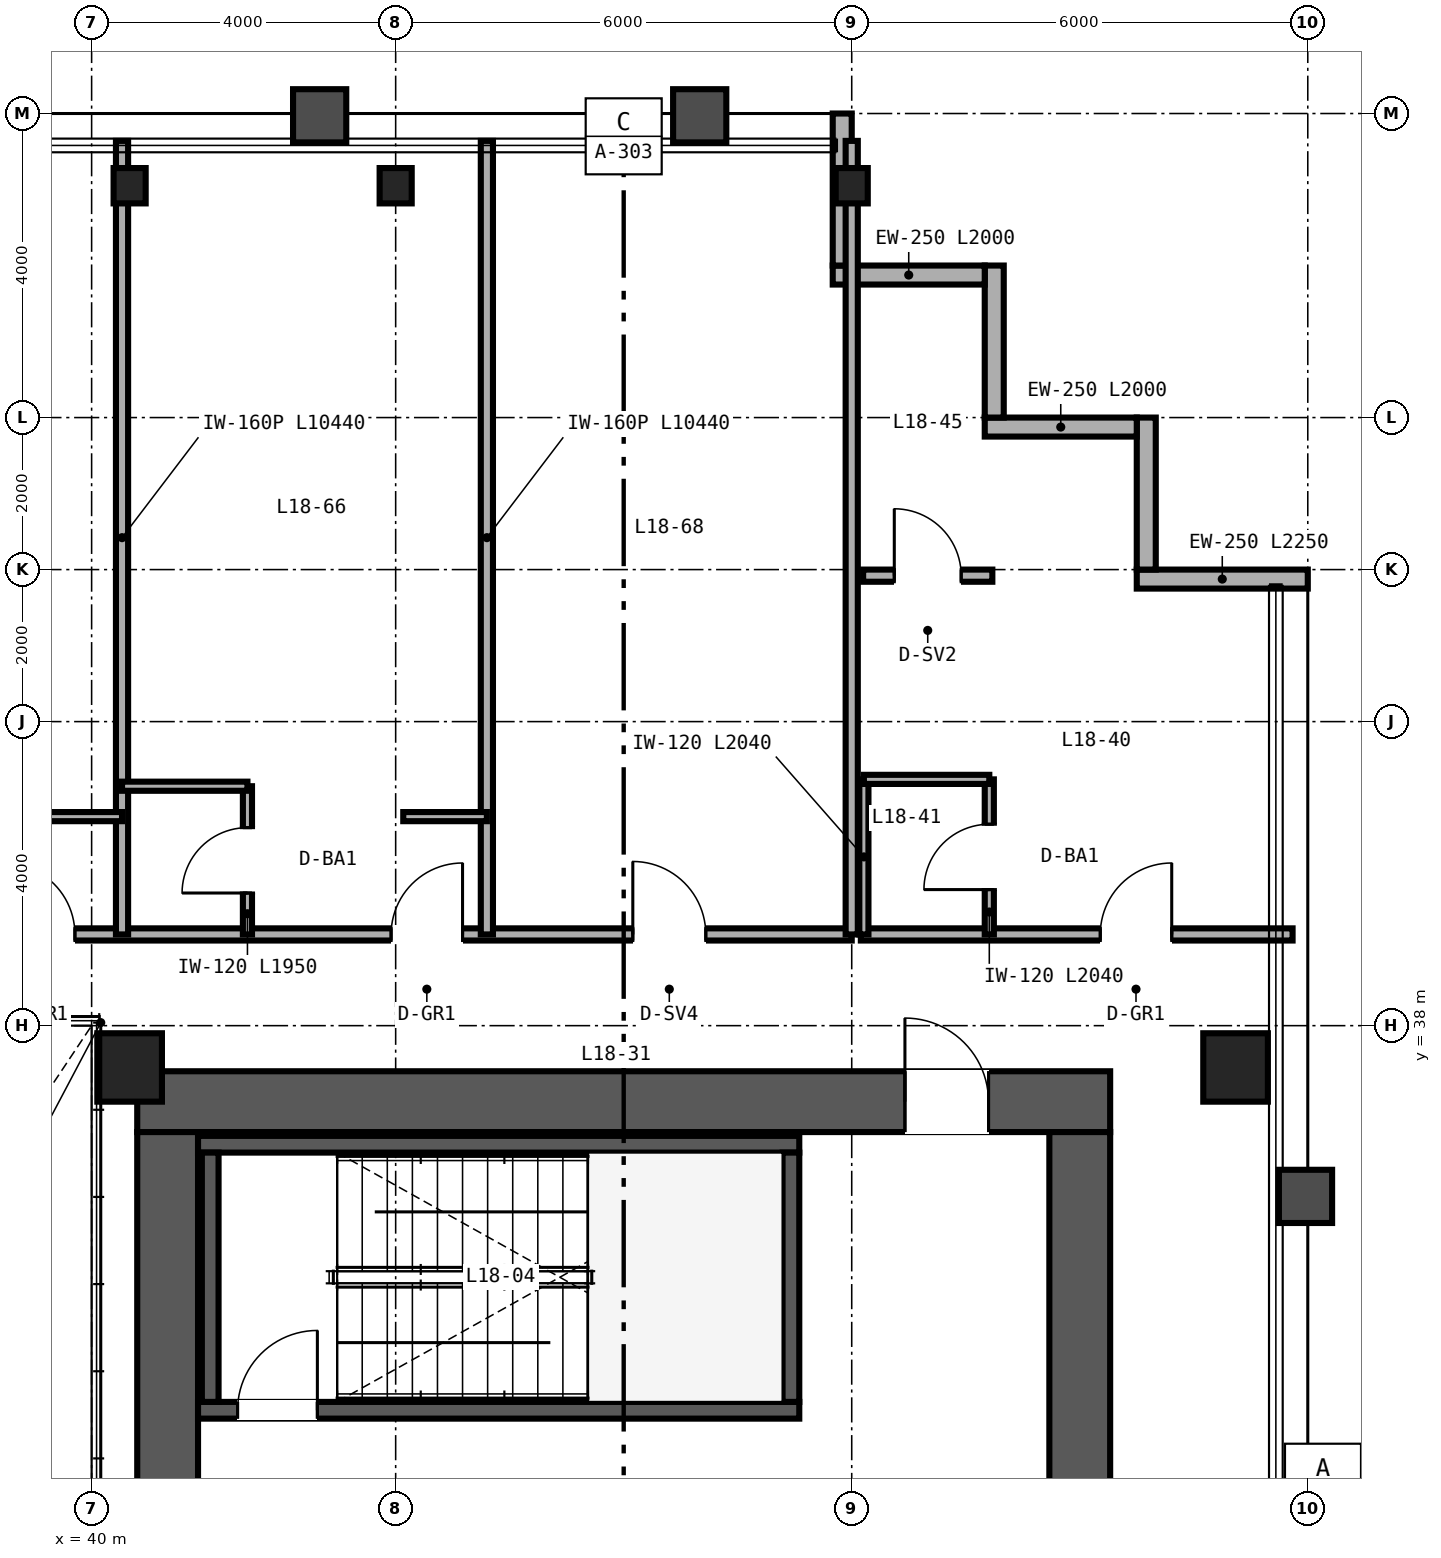
"""IFC4 building model, lengths in metres.
Left out: names, types, materials, properties, quantities, classifications, styles, units other than length and angle.
Written with IfcOpenShell. Run it as: python <this file> out.ifc"""

import sys

from ifc_helpers import new_model, si_unit, direction, frame, frame_2d, origin, origin_2d, place, context, subcontext, project, spatial, rectangle, hollow_rectangle, i_section, extrude, source, transform, mapped, element, fill, save


model = new_model("IFC4")
c1 = context("Model", 3, precision=1e-05, world=origin(), true_north=direction((0.0, 1.0)))
c2 = subcontext(c1, "Body", "Model", "MODEL_VIEW")
j1 = project(units=[si_unit("LENGTHUNIT", "METRE"), si_unit("PLANEANGLEUNIT", "RADIAN")], contexts=[c1])
p1 = place(None, origin())
s1 = spatial("IfcSite", under=j1, at=p1, CompositionType="ELEMENT")
p2 = place(p1, origin())
s2 = spatial("IfcBuilding", under=s1, at=p2, CompositionType="ELEMENT")
p3 = place(p2, frame((0.0, 0.0, 74.4)))
s3 = spatial("IfcBuildingStorey", under=s2, at=p3, CompositionType="ELEMENT", Elevation=74.4)
p4 = place(p3, frame((40.6, 37.0, 0.0), z_axis=(0.0, 0.0, 1.0), x_axis=(1.0, 0.0, 0.0)))
e1 = element("IfcWall", 1, at=p4, inside=s3, PredefinedType="SHEAR", context=c2, shape_type="SweptSolid", body=[
    extrude(rectangle(XDim=12.8, YDim=0.8, at=frame_2d((6.4, 0.0))), origin(), (0.0, 0.0, 1.0), 3.35),
])
p5 = place(p4, frame((10.1, 0.0, 0.0)))
e2 = element("IfcOpeningElement", 2, at=p5, cuts=e1, PredefinedType="OPENING", context=c2, shape_type="SweptSolid", body=[
    extrude(rectangle(XDim=1.1, YDim=2.15, at=frame_2d((0.55, 1.075))), frame((0.0, 0.41, 0.0), z_axis=(0.0, -1.0, 0.0), x_axis=(1.0, 0.0, 0.0)), (0.0, 0.0, 1.0), 0.82),
])
for number, where, z_axis, x_axis in (
    (3, (41.0, 15.4, 0.0), (0.0, 0.0, 1.0), (0.0, 1.0, 0.0)),
    (4, (53.0, 15.4, 0.0), (0.0, 0.0, 1.0), (0.0, 1.0, 0.0)),
):
    element("IfcWall", number, at=place(p3, frame(where, z_axis=z_axis, x_axis=x_axis)), inside=s3, PredefinedType="SHEAR", context=c2, shape_type="SweptSolid", body=[
        extrude(rectangle(XDim=21.2, YDim=0.8, at=frame_2d((10.6, 0.0))), origin(), (0.0, 0.0, 1.0), 3.35),
    ])
p6 = place(p3, frame((41.4, 32.94, 0.0), z_axis=(0.0, 0.0, 1.0), x_axis=(1.0, 0.0, 0.0)))
e5 = element("IfcWall", 5, at=p6, inside=s3, PredefinedType="SHEAR", context=c2, shape_type="SweptSolid", body=[
    extrude(rectangle(XDim=7.91, YDim=0.22, at=frame_2d((3.955, 0.0))), origin(), (0.0, 0.0, 1.0), 3.4),
])
p7 = place(p6, frame((0.52, 0.0, 0.0)))
e6 = element("IfcOpeningElement", 6, at=p7, cuts=e5, PredefinedType="OPENING", context=c2, shape_type="SweptSolid", body=[
    extrude(rectangle(XDim=1.05, YDim=2.15, at=frame_2d((0.525, 1.075))), frame((0.0, 0.12, 0.0), z_axis=(0.0, -1.0, 0.0), x_axis=(1.0, 0.0, 0.0)), (0.0, 0.0, 1.0), 0.24),
])
p8 = place(p3, frame((41.4, 36.44, 0.0), z_axis=(0.0, 0.0, 1.0), x_axis=(1.0, 0.0, 0.0)))
e7 = element("IfcWall", 7, at=p8, inside=s3, PredefinedType="SHEAR", context=c2, shape_type="SweptSolid", body=[
    extrude(rectangle(XDim=7.91, YDim=0.22, at=frame_2d((3.955, 0.0))), origin(), (0.0, 0.0, 1.0), 3.4),
])
for number, where, z_axis, x_axis in (
    (8, (41.56, 33.05, 0.0), (0.0, 0.0, 1.0), (0.0, 1.0, 0.0)),
    (9, (49.2, 33.05, 0.0), (0.0, 0.0, 1.0), (0.0, 1.0, 0.0)),
):
    element("IfcWall", number, at=place(p3, frame(where, z_axis=z_axis, x_axis=x_axis)), inside=s3, PredefinedType="SHEAR", context=c2, shape_type="SweptSolid", body=[
        extrude(rectangle(XDim=3.28, YDim=0.22, at=frame_2d((1.64, 0.0))), origin(), (0.0, 0.0, 1.0), 3.4),
    ])
m1 = source(origin(), c2, "Body", "SweptSolid", [
    extrude(hollow_rectangle(XDim=0.85, YDim=0.9, WallThickness=0.04, at=origin_2d()), origin(), (0.0, 0.0, 1.0), 3.35),
])
for number, where, z_axis, x_axis in (
    (10, (40.5, 37.45, 0.0), (0.0, 0.0, 1.0), (1.0, 0.0, 0.0)),
    (11, (55.05, 37.45, 0.0), (0.0, 0.0, 1.0), (1.0, 0.0, 0.0)),
):
    element("IfcColumn", number, at=place(p3, frame(where, z_axis=z_axis, x_axis=x_axis)), inside=s3, PredefinedType="COLUMN", context=c2, shape_type="MappedRepresentation", body=[
        mapped(m1, transform((0.0, 0.0, 0.0), scale=1.0)),
    ])
m2 = source(origin(), c2, "Body", "SweptSolid", [
    extrude(i_section(OverallWidth=0.422, OverallDepth=0.465, WebThickness=0.045, FlangeThickness=0.073, FilletRadius=0.025, at=origin_2d()), origin(), (0.0, 0.0, 1.0), 3.35),
])
for number, where, z_axis, x_axis in (
    (12, (40.5, 49.05, 0.0), (0.0, 0.0, 1.0), (1.0, 0.0, 0.0)),
    (13, (44.0, 49.05, 0.0), (0.0, 0.0, 1.0), (1.0, 0.0, 0.0)),
    (14, (50.0, 49.05, 0.0), (0.0, 0.0, 1.0), (1.0, 0.0, 0.0)),
):
    element("IfcColumn", number, at=place(p3, frame(where, z_axis=z_axis, x_axis=x_axis)), inside=s3, PredefinedType="COLUMN", context=c2, shape_type="MappedRepresentation", body=[
        mapped(m2, transform((0.0, 0.0, 0.0), scale=1.0)),
    ])
p9 = place(p3, frame((56.0, 43.875, 0.0), z_axis=(0.0, 0.0, 1.0), x_axis=(-1.0, 0.0, 0.0)))
e15 = element("IfcWall", 15, at=p9, inside=s3, PredefinedType="SOLIDWALL", context=c2, shape_type="SweptSolid", body=[
    extrude(rectangle(XDim=2.25, YDim=0.25, at=frame_2d((1.125, 0.0))), origin(), (0.0, 0.0, 1.0), 3.35),
])
for number, where, z_axis, x_axis in (
    (16, (53.875, 44.0, 0.0), (0.0, 0.0, 1.0), (0.0, 1.0, 0.0)),
    (17, (53.75, 45.875, 0.0), (0.0, 0.0, 1.0), (-1.0, 0.0, 0.0)),
    (18, (51.875, 46.0, 0.0), (0.0, 0.0, 1.0), (0.0, 1.0, 0.0)),
    (19, (51.75, 47.875, 0.0), (0.0, 0.0, 1.0), (-1.0, 0.0, 0.0)),
):
    element("IfcWall", number, at=place(p3, frame(where, z_axis=z_axis, x_axis=x_axis)), inside=s3, PredefinedType="SOLIDWALL", context=c2, shape_type="SweptSolid", body=[
        extrude(rectangle(XDim=2.0, YDim=0.25, at=frame_2d((1.0, 0.0))), origin(), (0.0, 0.0, 1.0), 3.35),
    ])
p10 = place(p3, frame((49.875, 48.0, 0.0), z_axis=(0.0, 0.0, 1.0), x_axis=(0.0, 1.0, 0.0)))
e20 = element("IfcWall", 20, at=p10, inside=s3, PredefinedType="SOLIDWALL", context=c2, shape_type="SweptSolid", body=[
    extrude(rectangle(XDim=2.0, YDim=0.25, at=frame_2d((1.0, 0.0))), origin(), (0.0, 0.0, 1.0), 2.657),
])
p11 = place(p3, frame((50.12, 39.2, 0.0), z_axis=(0.0, 0.0, 1.0), x_axis=(1.0, 0.0, 0.0)))
e21 = element("IfcWall", 21, at=p11, inside=s3, PredefinedType="PARTITIONING", context=c2, shape_type="SweptSolid", body=[
    extrude(rectangle(XDim=5.68, YDim=0.16, at=frame_2d((2.84, 0.0))), origin(), (0.0, 0.0, 1.0), 3.35),
])
p12 = place(p11, frame((3.15, 0.0, 0.0)))
e22 = element("IfcOpeningElement", 22, at=p12, cuts=e21, PredefinedType="OPENING", context=c2, shape_type="SweptSolid", body=[
    extrude(rectangle(XDim=0.94, YDim=2.15, at=frame_2d((0.47, 1.075))), frame((0.0, 0.09, 0.0), z_axis=(0.0, -1.0, 0.0), x_axis=(1.0, 0.0, 0.0)), (0.0, 0.0, 1.0), 0.18),
])
p13 = place(p3, frame((51.81, 39.2, 0.0), z_axis=(0.0, 0.0, 1.0), x_axis=(0.0, 1.0, 0.0)))
e23 = element("IfcWall", 23, at=p13, inside=s3, PredefinedType="PARTITIONING", context=c2, shape_type="SweptSolid", body=[
    extrude(rectangle(XDim=2.04, YDim=0.12, at=frame_2d((1.02, 0.0))), origin(), (0.0, 0.0, 1.0), 3.35),
])
p14 = place(p13, frame((0.59, 0.0, 0.0)))
e24 = element("IfcOpeningElement", 24, at=p14, cuts=e23, PredefinedType="OPENING", context=c2, shape_type="SweptSolid", body=[
    extrude(rectangle(XDim=0.86, YDim=2.1, at=frame_2d((0.43, 1.05))), frame((0.0, 0.07, 0.0), z_axis=(0.0, -1.0, 0.0), x_axis=(1.0, 0.0, 0.0)), (0.0, 0.0, 1.0), 0.14),
])
p15 = place(p3, frame((50.16, 39.2, 0.0), z_axis=(0.0, 0.0, 1.0), x_axis=(0.0, 1.0, 0.0)))
e25 = element("IfcWall", 25, at=p15, inside=s3, PredefinedType="PARTITIONING", context=c2, shape_type="SweptSolid", body=[
    extrude(rectangle(XDim=2.04, YDim=0.12, at=frame_2d((1.02, 0.0))), origin(), (0.0, 0.0, 1.0), 3.35),
])
p16 = place(p3, frame((50.16, 41.24, 0.0), z_axis=(0.0, 0.0, 1.0), x_axis=(1.0, 0.0, 0.0)))
e26 = element("IfcWall", 26, at=p16, inside=s3, PredefinedType="PARTITIONING", context=c2, shape_type="SweptSolid", body=[
    extrude(rectangle(XDim=1.65, YDim=0.12, at=frame_2d((0.825, 0.0))), origin(), (0.0, 0.0, 1.0), 3.35),
])
p17 = place(p3, frame((50.15, 43.92, 0.0), z_axis=(0.0, 0.0, 1.0), x_axis=(1.0, 0.0, 0.0)))
e27 = element("IfcWall", 27, at=p17, inside=s3, PredefinedType="PARTITIONING", context=c2, shape_type="SweptSolid", body=[
    extrude(rectangle(XDim=1.7, YDim=0.16, at=frame_2d((0.85, 0.0))), origin(), (0.0, 0.0, 1.0), 3.35),
])
p18 = place(p17, frame((0.41, 0.0, 0.0)))
e28 = element("IfcOpeningElement", 28, at=p18, cuts=e27, PredefinedType="OPENING", context=c2, shape_type="SweptSolid", body=[
    extrude(rectangle(XDim=0.88, YDim=2.15, at=frame_2d((0.44, 1.075))), frame((0.0, 0.09, 0.0), z_axis=(0.0, -1.0, 0.0), x_axis=(1.0, 0.0, 0.0)), (0.0, 0.0, 1.0), 0.18),
])
p19 = place(p3, frame((14.0, 39.2, 0.0), z_axis=(0.0, 0.0, 1.0), x_axis=(1.0, 0.0, 0.0)))
e29 = element("IfcWall", 29, at=p19, inside=s3, PredefinedType="PARTITIONING", context=c2, shape_type="SweptSolid", body=[
    extrude(rectangle(XDim=36.0, YDim=0.16, at=frame_2d((18.0, 0.0))), origin(), (0.0, 0.0, 1.0), 2.571),
])
p20 = place(p19, frame((3.74, 0.0, 0.0)))
e30 = element("IfcOpeningElement", 30, at=p20, cuts=e29, PredefinedType="OPENING", context=c2, shape_type="SweptSolid", body=[
    extrude(rectangle(XDim=0.94, YDim=2.15, at=frame_2d((0.47, 1.075))), frame((0.0, 0.09, 0.0), z_axis=(0.0, -1.0, 0.0), x_axis=(1.0, 0.0, 0.0)), (0.0, 0.0, 1.0), 0.18),
])
p21 = place(p19, frame((7.79, 0.0, 0.0)))
e31 = element("IfcOpeningElement", 31, at=p21, cuts=e29, PredefinedType="OPENING", context=c2, shape_type="SweptSolid", body=[
    extrude(rectangle(XDim=0.94, YDim=2.15, at=frame_2d((0.47, 1.075))), frame((0.0, 0.09, 0.0), z_axis=(0.0, -1.0, 0.0), x_axis=(1.0, 0.0, 0.0)), (0.0, 0.0, 1.0), 0.18),
])
p22 = place(p19, frame((12.22, 0.0, 0.0)))
e32 = element("IfcOpeningElement", 32, at=p22, cuts=e29, PredefinedType="OPENING", context=c2, shape_type="SweptSolid", body=[
    extrude(rectangle(XDim=0.96, YDim=2.15, at=frame_2d((0.48, 1.075))), frame((0.0, 0.09, 0.0), z_axis=(0.0, -1.0, 0.0), x_axis=(1.0, 0.0, 0.0)), (0.0, 0.0, 1.0), 0.18),
])
p23 = place(p19, frame((19.94, 0.0, 0.0)))
e33 = element("IfcOpeningElement", 33, at=p23, cuts=e29, PredefinedType="OPENING", context=c2, shape_type="SweptSolid", body=[
    extrude(rectangle(XDim=0.94, YDim=2.15, at=frame_2d((0.47, 1.075))), frame((0.0, 0.09, 0.0), z_axis=(0.0, -1.0, 0.0), x_axis=(1.0, 0.0, 0.0)), (0.0, 0.0, 1.0), 0.18),
])
p24 = place(p19, frame((24.84, 0.0, 0.0)))
e34 = element("IfcOpeningElement", 34, at=p24, cuts=e29, PredefinedType="OPENING", context=c2, shape_type="SweptSolid", body=[
    extrude(rectangle(XDim=0.94, YDim=2.15, at=frame_2d((0.47, 1.075))), frame((0.0, 0.09, 0.0), z_axis=(0.0, -1.0, 0.0), x_axis=(1.0, 0.0, 0.0)), (0.0, 0.0, 1.0), 0.18),
])
p25 = place(p19, frame((29.94, 0.0, 0.0)))
e35 = element("IfcOpeningElement", 35, at=p25, cuts=e29, PredefinedType="OPENING", context=c2, shape_type="SweptSolid", body=[
    extrude(rectangle(XDim=0.94, YDim=2.15, at=frame_2d((0.47, 1.075))), frame((0.0, 0.09, 0.0), z_axis=(0.0, -1.0, 0.0), x_axis=(1.0, 0.0, 0.0)), (0.0, 0.0, 1.0), 0.18),
])
p26 = place(p19, frame((33.12, 0.0, 0.0)))
e36 = element("IfcOpeningElement", 36, at=p26, cuts=e29, PredefinedType="OPENING", context=c2, shape_type="SweptSolid", body=[
    extrude(rectangle(XDim=0.96, YDim=2.15, at=frame_2d((0.48, 1.075))), frame((0.0, 0.09, 0.0), z_axis=(0.0, -1.0, 0.0), x_axis=(1.0, 0.0, 0.0)), (0.0, 0.0, 1.0), 0.18),
])
p27 = place(p3, frame((50.0, 39.2, 0.0), z_axis=(0.0, 0.0, 1.0), x_axis=(0.0, 1.0, 0.0)))
e37 = element("IfcWall", 37, at=p27, inside=s3, PredefinedType="PARTITIONING", context=c2, shape_type="SweptSolid", body=[
    extrude(rectangle(XDim=10.44, YDim=0.16, at=frame_2d((5.22, 0.0))), origin(), (0.0, 0.0, 1.0), 2.657),
])
p28 = place(p3, frame((40.4, 39.2, 0.0), z_axis=(0.0, 0.0, 1.0), x_axis=(0.0, 1.0, 0.0)))
e38 = element("IfcWall", 38, at=p28, inside=s3, PredefinedType="PARTITIONING", context=c2, shape_type="SweptSolid", body=[
    extrude(rectangle(XDim=10.44, YDim=0.16, at=frame_2d((5.22, 0.0))), origin(), (0.0, 0.0, 1.0), 2.423),
])
p29 = place(p3, frame((39.3, 40.75, 0.0), z_axis=(0.0, 0.0, 1.0), x_axis=(1.0, 0.0, 0.0)))
e39 = element("IfcWall", 39, at=p29, inside=s3, PredefinedType="PARTITIONING", context=c2, shape_type="SweptSolid", body=[
    extrude(rectangle(XDim=1.1, YDim=0.12, at=frame_2d((0.55, 0.0))), origin(), (0.0, 0.0, 1.0), 2.571),
])
p30 = place(p3, frame((45.2, 39.2, 0.0), z_axis=(0.0, 0.0, 1.0), x_axis=(0.0, 1.0, 0.0)))
e40 = element("IfcWall", 40, at=p30, inside=s3, PredefinedType="PARTITIONING", context=c2, shape_type="SweptSolid", body=[
    extrude(rectangle(XDim=10.44, YDim=0.16, at=frame_2d((5.22, 0.0))), origin(), (0.0, 0.0, 1.0), 2.657),
])
p31 = place(p3, frame((42.05, 39.2, 0.0), z_axis=(0.0, 0.0, 1.0), x_axis=(0.0, 1.0, 0.0)))
e41 = element("IfcWall", 41, at=p31, inside=s3, PredefinedType="PARTITIONING", context=c2, shape_type="SweptSolid", body=[
    extrude(rectangle(XDim=1.95, YDim=0.12, at=frame_2d((0.975, 0.0))), origin(), (0.0, 0.0, 1.0), 3.35),
])
p32 = place(p31, frame((0.545, 0.0, 0.0)))
e42 = element("IfcOpeningElement", 42, at=p32, cuts=e41, PredefinedType="OPENING", context=c2, shape_type="SweptSolid", body=[
    extrude(rectangle(XDim=0.86, YDim=2.1, at=frame_2d((0.43, 1.05))), frame((0.0, 0.07, 0.0), z_axis=(0.0, -1.0, 0.0), x_axis=(1.0, 0.0, 0.0)), (0.0, 0.0, 1.0), 0.14),
])
p33 = place(p3, frame((40.4, 41.15, 0.0), z_axis=(0.0, 0.0, 1.0), x_axis=(1.0, 0.0, 0.0)))
e43 = element("IfcWall", 43, at=p33, inside=s3, PredefinedType="PARTITIONING", context=c2, shape_type="SweptSolid", body=[
    extrude(rectangle(XDim=1.65, YDim=0.12, at=frame_2d((0.825, 0.0))), origin(), (0.0, 0.0, 1.0), 2.571),
])
p34 = place(p3, frame((44.1, 40.75, 0.0), z_axis=(0.0, 0.0, 1.0), x_axis=(1.0, 0.0, 0.0)))
e44 = element("IfcWall", 44, at=p34, inside=s3, PredefinedType="PARTITIONING", context=c2, shape_type="SweptSolid", body=[
    extrude(rectangle(XDim=1.1, YDim=0.12, at=frame_2d((0.55, 0.0))), origin(), (0.0, 0.0, 1.0), 3.35),
])
m3 = source(origin(), c2, "Body", "SweptSolid", [
    extrude(rectangle(XDim=1.05, YDim=2.15, at=frame_2d((0.525, 1.075))), frame((0.0, 0.025, 0.0), z_axis=(0.0, -1.0, 0.0), x_axis=(1.0, 0.0, 0.0)), (0.0, 0.0, 1.0), 0.05),
])
p35 = place(p7, origin())
e45 = element("IfcDoor", 45, at=p35, inside=s3, OperationType="SINGLE_SWING_RIGHT", PredefinedType="DOOR", context=c2, shape_type="MappedRepresentation", body=[
    mapped(m3, transform((0.0, 0.0, 0.0), scale=1.0)),
])
fill(e6, e45)
m4 = source(origin(), c2, "Body", "SweptSolid", [
    extrude(rectangle(XDim=1.1, YDim=2.15, at=frame_2d((0.55, 1.075))), frame((0.0, 0.025, 0.0), z_axis=(0.0, -1.0, 0.0), x_axis=(1.0, 0.0, 0.0)), (0.0, 0.0, 1.0), 0.05),
])
p36 = place(p5, origin())
e46 = element("IfcDoor", 46, at=p36, inside=s3, OperationType="SINGLE_SWING_LEFT", PredefinedType="DOOR", context=c2, shape_type="MappedRepresentation", body=[
    mapped(m4, transform((0.0, 0.0, 0.0), scale=1.0)),
])
fill(e2, e46)
m5 = source(origin(), c2, "Body", "SweptSolid", [
    extrude(rectangle(XDim=0.86, YDim=2.1, at=frame_2d((0.43, 1.05))), frame((0.0, 0.025, 0.0), z_axis=(0.0, -1.0, 0.0), x_axis=(1.0, 0.0, 0.0)), (0.0, 0.0, 1.0), 0.05),
])
p37 = place(p14, origin())
e47 = element("IfcDoor", 47, at=p37, inside=s3, OperationType="SINGLE_SWING_LEFT", PredefinedType="DOOR", context=c2, shape_type="MappedRepresentation", body=[
    mapped(m5, transform((0.0, 0.0, 0.0), scale=1.0)),
])
fill(e24, e47)
m6 = source(origin(), c2, "Body", "SweptSolid", [
    extrude(rectangle(XDim=0.94, YDim=2.15, at=frame_2d((0.47, 1.075))), frame((0.0, 0.025, 0.0), z_axis=(0.0, -1.0, 0.0), x_axis=(1.0, 0.0, 0.0)), (0.0, 0.0, 1.0), 0.05),
])
p38 = place(p12, origin())
e48 = element("IfcDoor", 48, at=p38, inside=s3, OperationType="SINGLE_SWING_RIGHT", PredefinedType="DOOR", context=c2, shape_type="MappedRepresentation", body=[
    mapped(m6, transform((0.0, 0.0, 0.0), scale=1.0)),
])
fill(e22, e48)
m7 = source(origin(), c2, "Body", "SweptSolid", [
    extrude(rectangle(XDim=0.88, YDim=2.15, at=frame_2d((0.44, 1.075))), frame((0.0, 0.025, 0.0), z_axis=(0.0, -1.0, 0.0), x_axis=(1.0, 0.0, 0.0)), (0.0, 0.0, 1.0), 0.05),
])
p39 = place(p18, origin())
e49 = element("IfcDoor", 49, at=p39, inside=s3, OperationType="SINGLE_SWING_LEFT", PredefinedType="DOOR", context=c2, shape_type="MappedRepresentation", body=[
    mapped(m7, transform((0.0, 0.0, 0.0), scale=1.0)),
])
fill(e28, e49)
p40 = place(p32, origin())
e50 = element("IfcDoor", 50, at=p40, inside=s3, OperationType="SINGLE_SWING_LEFT", PredefinedType="DOOR", context=c2, shape_type="MappedRepresentation", body=[
    mapped(m5, transform((0.0, 0.0, 0.0), scale=1.0)),
])
fill(e42, e50)
p41 = place(p24, origin())
e51 = element("IfcDoor", 51, at=p41, inside=s3, OperationType="SINGLE_SWING_LEFT", PredefinedType="DOOR", context=c2, shape_type="MappedRepresentation", body=[
    mapped(m6, transform((0.0, 0.0, 0.0), scale=1.0)),
])
fill(e34, e51)
p42 = place(p25, origin())
e52 = element("IfcDoor", 52, at=p42, inside=s3, OperationType="SINGLE_SWING_RIGHT", PredefinedType="DOOR", context=c2, shape_type="MappedRepresentation", body=[
    mapped(m6, transform((0.0, 0.0, 0.0), scale=1.0)),
])
fill(e35, e52)
m8 = source(origin(), c2, "Body", "SweptSolid", [
    extrude(rectangle(XDim=0.96, YDim=2.15, at=frame_2d((0.48, 1.075))), frame((0.0, 0.025, 0.0), z_axis=(0.0, -1.0, 0.0), x_axis=(1.0, 0.0, 0.0)), (0.0, 0.0, 1.0), 0.05),
])
p43 = place(p26, origin())
e53 = element("IfcDoor", 53, at=p43, inside=s3, OperationType="SINGLE_SWING_LEFT", PredefinedType="DOOR", context=c2, shape_type="MappedRepresentation", body=[
    mapped(m8, transform((0.0, 0.0, 0.0), scale=1.0)),
])
fill(e36, e53)
save(model, sys.argv[1])
